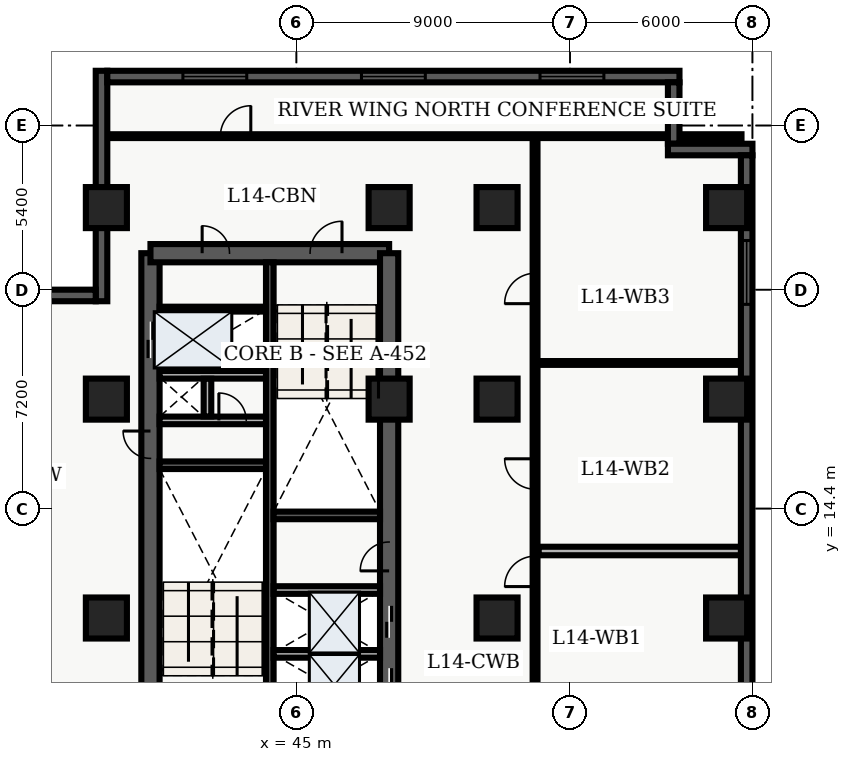
"""IFC4 building model, lengths in metres.
Left out: names, types, materials, properties, quantities, classifications, styles, units other than length and angle.
Written with IfcOpenShell. Run it as: python <this file> out.ifc"""

import sys

from ifc_helpers import new_model, entity, si_unit, converted_unit, direction, frame, origin_with_axes, origin_2d_with_axis, place, context, subcontext, project, spatial, polyline, rectangle, outline, extrude, element, fill, save


model = new_model("IFC4")
c1 = context("Model", 3, precision=1e-05, world=origin_with_axes(), true_north=direction((0.0, 1.0)))
c2 = subcontext(c1, "Body", "Model", "MODEL_VIEW")
j1 = project(units=[si_unit("LENGTHUNIT", "METRE"), converted_unit("PLANEANGLEUNIT", "DEGREE", entity("IfcPlaneAngleMeasure", 0.017), si_unit("PLANEANGLEUNIT", "RADIAN"), dimensions=[0, 0, 0, 0, 0, 0, 0])], contexts=[c1])
p1 = place(None, origin_with_axes())
s1 = spatial("IfcSite", under=j1, at=p1, CompositionType="ELEMENT")
p2 = place(p1, origin_with_axes())
s2 = spatial("IfcBuilding", under=s1, at=p2, CompositionType="ELEMENT")
p3 = place(p2, frame((0.0, 0.0, 60.0), z_axis=(0.0, 0.0, 1.0), x_axis=(1.0, 0.0, 0.0)))
s3 = spatial("IfcBuildingStorey", under=s2, at=p3, CompositionType="ELEMENT", Elevation=60.0)
p4 = place(p3, frame((40.2, 7.2, 0.0), z_axis=(0.0, 0.0, 1.0), x_axis=(0.0, 1.0, 0.0)))
e1 = element("IfcWall", 1, at=p4, inside=s3, PredefinedType="SHEAR", context=c2, shape_type="SweptSolid", body=[
    extrude(outline(polyline([(0.0, -0.3), (15.6, -0.3), (15.6, 0.3), (0.0, 0.3), (0.0, -0.3)])), origin_with_axes(), (0.0, 0.0, 1.0), 3.66),
])
p5 = place(p4, frame((12.75, 0.0, 0.0), z_axis=(0.0, 0.0, 1.0), x_axis=(1.0, 0.0, 0.0)))
e2 = element("IfcOpeningElement", 2, at=p5, cuts=e1, PredefinedType="OPENING", context=c2, shape_type="SweptSolid", body=[
    extrude(rectangle(XDim=1.2, YDim=0.62, at=origin_2d_with_axis()), origin_with_axes(), (0.0, 0.0, 1.0), 2.15),
])
p6 = place(p4, frame((9.3, 0.0, 0.0), z_axis=(0.0, 0.0, 1.0), x_axis=(1.0, 0.0, 0.0)))
e3 = element("IfcOpeningElement", 3, at=p6, cuts=e1, PredefinedType="OPENING", context=c2, shape_type="SweptSolid", body=[
    extrude(rectangle(XDim=0.9, YDim=0.62, at=origin_2d_with_axis()), origin_with_axes(), (0.0, 0.0, 1.0), 2.15),
])
p7 = place(p3, frame((40.2, 22.8, 0.0), z_axis=(0.0, 0.0, 1.0), x_axis=(1.0, 0.0, 0.0)))
e4 = element("IfcWall", 4, at=p7, inside=s3, PredefinedType="SHEAR", context=c2, shape_type="SweptSolid", body=[
    extrude(outline(polyline([(0.0, -0.3), (7.85, -0.3), (7.85, 0.3), (0.0, 0.3), (0.0, -0.3)])), origin_with_axes(), (0.0, 0.0, 1.0), 3.66),
])
p8 = place(p7, frame((5.775, 0.0, 0.0), z_axis=(0.0, 0.0, 1.0), x_axis=(1.0, 0.0, 0.0)))
e5 = element("IfcOpeningElement", 5, at=p8, cuts=e4, PredefinedType="OPENING", context=c2, shape_type="SweptSolid", body=[
    extrude(rectangle(XDim=1.05, YDim=0.62, at=origin_2d_with_axis()), origin_with_axes(), (0.0, 0.0, 1.0), 2.15),
])
p9 = place(p7, frame((2.15, 0.0, 0.0), z_axis=(0.0, 0.0, 1.0), x_axis=(1.0, 0.0, 0.0)))
e6 = element("IfcOpeningElement", 6, at=p9, cuts=e4, PredefinedType="OPENING", context=c2, shape_type="SweptSolid", body=[
    extrude(rectangle(XDim=0.9, YDim=0.62, at=origin_2d_with_axis()), origin_with_axes(), (0.0, 0.0, 1.0), 2.15),
])
p10 = place(p3, frame((48.05, 7.2, 0.0), z_axis=(0.0, 0.0, 1.0), x_axis=(0.0, 1.0, 0.0)))
e7 = element("IfcWall", 7, at=p10, inside=s3, PredefinedType="SHEAR", context=c2, shape_type="SweptSolid", body=[
    extrude(outline(polyline([(0.0, -0.3), (15.6, -0.3), (15.6, 0.3), (0.0, 0.3), (0.0, -0.3)])), origin_with_axes(), (0.0, 0.0, 1.0), 3.66),
])
p11 = place(p10, frame((1.425, 0.0, 0.0), z_axis=(0.0, 0.0, 1.0), x_axis=(1.0, 0.0, 0.0)))
e8 = element("IfcOpeningElement", 8, at=p11, cuts=e7, PredefinedType="OPENING", context=c2, shape_type="SweptSolid", body=[
    extrude(rectangle(XDim=1.05, YDim=0.62, at=origin_2d_with_axis()), origin_with_axes(), (0.0, 0.0, 1.0), 2.15),
])
p12 = place(p10, frame((3.475, 0.0, 0.0), z_axis=(0.0, 0.0, 1.0), x_axis=(1.0, 0.0, 0.0)))
e9 = element("IfcOpeningElement", 9, at=p12, cuts=e7, PredefinedType="OPENING", context=c2, shape_type="SweptSolid", body=[
    extrude(rectangle(XDim=1.05, YDim=0.62, at=origin_2d_with_axis()), origin_with_axes(), (0.0, 0.0, 1.0), 2.15),
])
p13 = place(p10, frame((5.625, 0.0, 0.0), z_axis=(0.0, 0.0, 1.0), x_axis=(1.0, 0.0, 0.0)))
e10 = element("IfcOpeningElement", 10, at=p13, cuts=e7, PredefinedType="OPENING", context=c2, shape_type="SweptSolid", body=[
    extrude(rectangle(XDim=0.95, YDim=0.62, at=origin_2d_with_axis()), origin_with_axes(), (0.0, 0.0, 1.0), 2.15),
])
p14 = place(p3, frame((44.125, 7.5, 0.0), z_axis=(0.0, 0.0, 1.0), x_axis=(0.0, 1.0, 0.0)))
e11 = element("IfcWall", 11, at=p14, inside=s3, PredefinedType="SHEAR", context=c2, shape_type="SweptSolid", body=[
    extrude(outline(polyline([(0.0, -0.125), (15.0, -0.125), (15.0, 0.125), (0.0, 0.125), (0.0, -0.125)])), origin_with_axes(), (0.0, 0.0, 1.0), 3.66),
])
for number, where, z_axis, x_axis in (
    (12, (40.5, 15.825, 0.0), (0.0, 0.0, 1.0), (1.0, 0.0, 0.0)),
    (13, (44.25, 14.175, 0.0), (0.0, 0.0, 1.0), (1.0, 0.0, 0.0)),
):
    element("IfcWall", number, at=place(p3, frame(where, z_axis=z_axis, x_axis=x_axis)), inside=s3, PredefinedType="SHEAR", context=c2, shape_type="SweptSolid", body=[
        extrude(outline(polyline([(0.0, -0.125), (3.5, -0.125), (3.5, 0.125), (0.0, 0.125), (0.0, -0.125)])), origin_with_axes(), (0.0, 0.0, 1.0), 3.66),
    ])
p15 = place(p3, frame((40.5, 17.3, 0.0), z_axis=(0.0, 0.0, 1.0), x_axis=(1.0, 0.0, 0.0)))
e14 = element("IfcWall", 14, at=p15, inside=s3, PredefinedType="SOLIDWALL", context=c2, shape_type="SweptSolid", body=[
    extrude(outline(polyline([(0.0, -0.125), (3.5, -0.125), (3.5, 0.125), (0.0, 0.125), (0.0, -0.125)])), origin_with_axes(), (0.0, 0.0, 1.0), 2.7),
])
p16 = place(p15, frame((2.4, 0.0, 0.0), z_axis=(0.0, 0.0, 1.0), x_axis=(1.0, 0.0, 0.0)))
e15 = element("IfcOpeningElement", 15, at=p16, cuts=e14, PredefinedType="OPENING", context=c2, shape_type="SweptSolid", body=[
    extrude(rectangle(XDim=0.9, YDim=0.27, at=origin_2d_with_axis()), origin_with_axes(), (0.0, 0.0, 1.0), 2.15),
])
p17 = place(p3, frame((40.5, 18.8, 0.0), z_axis=(0.0, 0.0, 1.0), x_axis=(1.0, 0.0, 0.0)))
e16 = element("IfcWall", 16, at=p17, inside=s3, PredefinedType="SOLIDWALL", context=c2, shape_type="SweptSolid", body=[
    extrude(outline(polyline([(0.0, -0.125), (3.5, -0.125), (3.5, 0.125), (0.0, 0.125), (0.0, -0.125)])), origin_with_axes(), (0.0, 0.0, 1.0), 2.7),
])
p18 = place(p3, frame((42.075, 17.43, 0.0), z_axis=(0.0, 0.0, 1.0), x_axis=(0.0, 1.0, 0.0)))
e17 = element("IfcWall", 17, at=p18, inside=s3, PredefinedType="SOLIDWALL", context=c2, shape_type="SweptSolid", body=[
    extrude(outline(polyline([(0.0, -0.125), (1.24, -0.125), (1.24, 0.125), (0.0, 0.125), (0.0, -0.125)])), origin_with_axes(), (0.0, 0.0, 1.0), 2.7),
])
for number, where, z_axis, x_axis in (
    (18, (38.75, 10.8, 0.0), (0.0, 0.0, 1.0), (1.0, 0.0, 0.0)),
    (19, (38.75, 18.0, 0.0), (0.0, 0.0, 1.0), (1.0, 0.0, 0.0)),
    (20, (38.75, 24.3, 0.0), (0.0, 0.0, 1.0), (1.0, 0.0, 0.0)),
    (21, (48.05, 18.0, 0.0), (0.0, 0.0, 1.0), (1.0, 0.0, 0.0)),
    (22, (48.05, 24.3, 0.0), (0.0, 0.0, 1.0), (1.0, 0.0, 0.0)),
    (23, (51.6, 10.8, 0.0), (0.0, 0.0, 1.0), (1.0, 0.0, 0.0)),
    (24, (51.6, 18.0, 0.0), (0.0, 0.0, 1.0), (1.0, 0.0, 0.0)),
    (25, (51.6, 24.3, 0.0), (0.0, 0.0, 1.0), (1.0, 0.0, 0.0)),
    (26, (59.15, 10.8, 0.0), (0.0, 0.0, 1.0), (1.0, 0.0, 0.0)),
    (27, (59.15, 18.0, 0.0), (0.0, 0.0, 1.0), (1.0, 0.0, 0.0)),
    (28, (59.15, 24.3, 0.0), (0.0, 0.0, 1.0), (1.0, 0.0, 0.0)),
):
    element("IfcColumn", number, at=place(p3, frame(where, z_axis=z_axis, x_axis=x_axis)), inside=s3, PredefinedType="COLUMN", context=c2, shape_type="SweptSolid", body=[
        extrude(rectangle(XDim=1.35, YDim=1.35, at=origin_2d_with_axis()), origin_with_axes(), (0.0, 0.0, 1.0), 3.9),
    ])
p19 = place(p3, frame((40.5, 20.96, 0.0), z_axis=(0.0, 0.0, 1.0), x_axis=(1.0, 0.0, 0.0)))
e29 = element("IfcWall", 29, at=p19, inside=s3, PredefinedType="PARTITIONING", context=c2, shape_type="SweptSolid", body=[
    extrude(outline(polyline([(0.0, -0.08), (3.5, -0.08), (3.5, 0.08), (0.0, 0.08), (0.0, -0.08)])), origin_with_axes(), (0.0, 0.0, 1.0), 2.7),
])
for number, where, z_axis, x_axis in (
    (30, (44.25, 9.62, 0.0), (0.0, 0.0, 1.0), (1.0, 0.0, 0.0)),
    (31, (44.25, 11.72, 0.0), (0.0, 0.0, 1.0), (1.0, 0.0, 0.0)),
):
    element("IfcWall", number, at=place(p3, frame(where, z_axis=z_axis, x_axis=x_axis)), inside=s3, PredefinedType="SOLIDWALL", context=c2, shape_type="SweptSolid", body=[
        extrude(outline(polyline([(0.0, -0.125), (3.5, -0.125), (3.5, 0.125), (0.0, 0.125), (0.0, -0.125)])), origin_with_axes(), (0.0, 0.0, 1.0), 2.7),
    ])
p20 = place(p3, frame((52.85, 7.85, 0.0), z_axis=(0.0, 0.0, 1.0), x_axis=(0.0, 1.0, 0.0)))
e32 = element("IfcWall", 32, at=p20, inside=s3, PredefinedType="PARTITIONING", context=c2, shape_type="SweptSolid", body=[
    extrude(outline(polyline([(0.0, -0.08), (18.8, -0.08), (18.8, 0.08), (0.0, 0.08), (0.0, -0.08)])), origin_with_axes(), (0.0, 0.0, 1.0), 2.7),
])
p21 = place(p20, frame((4.484, 0.0, 0.0), z_axis=(0.0, 0.0, 1.0), x_axis=(1.0, 0.0, 0.0)))
e33 = element("IfcOpeningElement", 33, at=p21, cuts=e32, PredefinedType="OPENING", context=c2, shape_type="SweptSolid", body=[
    extrude(rectangle(XDim=1.0, YDim=0.18, at=origin_2d_with_axis()), origin_with_axes(), (0.0, 0.0, 1.0), 2.15),
])
p22 = place(p20, frame((7.687, 0.0, 0.0), z_axis=(0.0, 0.0, 1.0), x_axis=(1.0, 0.0, 0.0)))
e34 = element("IfcOpeningElement", 34, at=p22, cuts=e32, PredefinedType="OPENING", context=c2, shape_type="SweptSolid", body=[
    extrude(rectangle(XDim=1.0, YDim=0.18, at=origin_2d_with_axis()), origin_with_axes(), (0.0, 0.0, 1.0), 2.15),
])
p23 = place(p20, frame((13.79, 0.0, 0.0), z_axis=(0.0, 0.0, 1.0), x_axis=(1.0, 0.0, 0.0)))
e35 = element("IfcOpeningElement", 35, at=p23, cuts=e32, PredefinedType="OPENING", context=c2, shape_type="SweptSolid", body=[
    extrude(rectangle(XDim=1.0, YDim=0.18, at=origin_2d_with_axis()), origin_with_axes(), (0.0, 0.0, 1.0), 2.15),
])
p24 = place(p3, frame((38.76, 26.65, 0.0), z_axis=(0.0, 0.0, 1.0), x_axis=(1.0, 0.0, 0.0)))
e36 = element("IfcWall", 36, at=p24, inside=s3, PredefinedType="PARTITIONING", context=c2, shape_type="SweptSolid", body=[
    extrude(outline(polyline([(0.0, -0.062), (20.88, -0.062), (20.88, 0.062), (0.0, 0.062), (0.0, -0.062)])), origin_with_axes(), (0.0, 0.0, 1.0), 2.7),
])
p25 = place(p24, frame((4.24, 0.0, 0.0), z_axis=(0.0, 0.0, 1.0), x_axis=(1.0, 0.0, 0.0)))
e37 = element("IfcOpeningElement", 37, at=p25, cuts=e36, PredefinedType="OPENING", context=c2, shape_type="SweptSolid", body=[
    extrude(rectangle(XDim=1.0, YDim=0.145, at=origin_2d_with_axis()), origin_with_axes(), (0.0, 0.0, 1.0), 2.15),
])
p26 = place(p3, frame((52.97, 13.004, 0.0), z_axis=(0.0, 0.0, 1.0), x_axis=(1.0, 0.0, 0.0)))
e38 = element("IfcWall", 38, at=p26, inside=s3, PredefinedType="PARTITIONING", context=c2, shape_type="SweptSolid", body=[
    extrude(outline(polyline([(0.0, -0.14), (6.655, -0.14), (6.655, 0.14), (0.0, 0.14), (0.0, -0.14)])), origin_with_axes(), (0.0, 0.0, 1.0), 2.7),
])
p27 = place(p3, frame((52.97, 19.189, 0.0), z_axis=(0.0, 0.0, 1.0), x_axis=(1.0, 0.0, 0.0)))
e39 = element("IfcWall", 39, at=p27, inside=s3, PredefinedType="PARTITIONING", context=c2, shape_type="SweptSolid", body=[
    extrude(outline(polyline([(0.0, -0.062), (6.655, -0.062), (6.655, 0.062), (0.0, 0.062), (0.0, -0.062)])), origin_with_axes(), (0.0, 0.0, 1.0), 2.7),
])
p28 = place(p3, frame((38.59, 21.22, 0.0), z_axis=(0.0, 0.0, 1.0), x_axis=(0.0, 1.0, 0.0)))
e40 = element("IfcWall", 40, at=p28, inside=s3, PredefinedType="SOLIDWALL", context=c2, shape_type="SweptSolid", body=[
    extrude(outline(polyline([(0.0, -0.19), (7.58, -0.19), (7.58, 0.19), (0.0, 0.19), (0.0, -0.19)])), origin_with_axes(), (0.0, 0.0, 1.0), 3.66),
])
p29 = place(p3, frame((38.78, 28.61, 0.0), z_axis=(0.0, 0.0, 1.0), x_axis=(1.0, 0.0, 0.0)))
e41 = element("IfcWall", 41, at=p29, inside=s3, PredefinedType="SOLIDWALL", context=c2, shape_type="SweptSolid", body=[
    extrude(outline(polyline([(0.0, -0.19), (18.82, -0.19), (18.82, 0.19), (0.0, 0.19), (0.0, -0.19)])), origin_with_axes(), (0.0, 0.0, 1.0), 3.66),
])
p30 = place(p29, frame((3.537, 0.0, 0.45), z_axis=(0.0, 0.0, 1.0), x_axis=(1.0, 0.0, 0.0)))
e42 = element("IfcOpeningElement", 42, at=p30, cuts=e41, PredefinedType="OPENING", context=c2, shape_type="SweptSolid", body=[
    extrude(rectangle(XDim=2.1, YDim=0.4, at=origin_2d_with_axis()), origin_with_axes(), (0.0, 0.0, 1.0), 2.2),
])
p31 = place(p29, frame((9.41, 0.0, 0.45), z_axis=(0.0, 0.0, 1.0), x_axis=(1.0, 0.0, 0.0)))
e43 = element("IfcOpeningElement", 43, at=p31, cuts=e41, PredefinedType="OPENING", context=c2, shape_type="SweptSolid", body=[
    extrude(rectangle(XDim=2.1, YDim=0.4, at=origin_2d_with_axis()), origin_with_axes(), (0.0, 0.0, 1.0), 2.2),
])
p32 = place(p29, frame((15.283, 0.0, 0.45), z_axis=(0.0, 0.0, 1.0), x_axis=(1.0, 0.0, 0.0)))
e44 = element("IfcOpeningElement", 44, at=p32, cuts=e41, PredefinedType="OPENING", context=c2, shape_type="SweptSolid", body=[
    extrude(rectangle(XDim=2.1, YDim=0.4, at=origin_2d_with_axis()), origin_with_axes(), (0.0, 0.0, 1.0), 2.2),
])
p33 = place(p3, frame((57.41, 28.42, 0.0), z_axis=(0.0, 0.0, 1.0), x_axis=(0.0, -1.0, 0.0)))
e45 = element("IfcWall", 45, at=p33, inside=s3, PredefinedType="SOLIDWALL", context=c2, shape_type="SweptSolid", body=[
    extrude(outline(polyline([(0.0, -0.19), (2.02, -0.19), (2.02, 0.19), (0.0, 0.19), (0.0, -0.19)])), origin_with_axes(), (0.0, 0.0, 1.0), 3.66),
])
p34 = place(p3, frame((57.22, 26.21, 0.0), z_axis=(0.0, 0.0, 1.0), x_axis=(1.0, 0.0, 0.0)))
e46 = element("IfcWall", 46, at=p34, inside=s3, PredefinedType="SOLIDWALL", context=c2, shape_type="SweptSolid", body=[
    extrude(outline(polyline([(0.0, -0.19), (2.78, -0.19), (2.78, 0.19), (0.0, 0.19), (0.0, -0.19)])), origin_with_axes(), (0.0, 0.0, 1.0), 3.66),
])
p35 = place(p3, frame((59.81, 26.02, 0.0), z_axis=(0.0, 0.0, 1.0), x_axis=(0.0, -1.0, 0.0)))
e47 = element("IfcWall", 47, at=p35, inside=s3, PredefinedType="SOLIDWALL", context=c2, shape_type="SweptSolid", body=[
    extrude(outline(polyline([(0.0, -0.19), (23.62, -0.19), (23.62, 0.19), (0.0, 0.19), (0.0, -0.19)])), origin_with_axes(), (0.0, 0.0, 1.0), 3.66),
])
p36 = place(p35, frame((3.853, 0.0, 0.45), z_axis=(0.0, 0.0, 1.0), x_axis=(1.0, 0.0, 0.0)))
e48 = element("IfcOpeningElement", 48, at=p36, cuts=e47, PredefinedType="OPENING", context=c2, shape_type="SweptSolid", body=[
    extrude(rectangle(XDim=2.1, YDim=0.4, at=origin_2d_with_axis()), origin_with_axes(), (0.0, 0.0, 1.0), 2.2),
])
p37 = place(p35, frame((20.218, 0.0, 0.45), z_axis=(0.0, 0.0, 1.0), x_axis=(1.0, 0.0, 0.0)))
e49 = element("IfcOpeningElement", 49, at=p37, cuts=e47, PredefinedType="OPENING", context=c2, shape_type="SweptSolid", body=[
    extrude(rectangle(XDim=2.1, YDim=0.4, at=origin_2d_with_axis()), origin_with_axes(), (0.0, 0.0, 1.0), 2.2),
])
p38 = place(p3, frame((21.22, 21.41, 0.0), z_axis=(0.0, 0.0, 1.0), x_axis=(1.0, 0.0, 0.0)))
e50 = element("IfcWall", 50, at=p38, inside=s3, PredefinedType="SOLIDWALL", context=c2, shape_type="SweptSolid", body=[
    extrude(outline(polyline([(0.0, -0.19), (17.18, -0.19), (17.18, 0.19), (0.0, 0.19), (0.0, -0.19)])), origin_with_axes(), (0.0, 0.0, 1.0), 3.66),
])
p39 = place(p38, frame((3.263, 0.0, 0.45), z_axis=(0.0, 0.0, 1.0), x_axis=(1.0, 0.0, 0.0)))
e51 = element("IfcOpeningElement", 51, at=p39, cuts=e50, PredefinedType="OPENING", context=c2, shape_type="SweptSolid", body=[
    extrude(rectangle(XDim=2.1, YDim=0.4, at=origin_2d_with_axis()), origin_with_axes(), (0.0, 0.0, 1.0), 2.2),
])
p40 = place(p38, frame((8.59, 0.0, 0.45), z_axis=(0.0, 0.0, 1.0), x_axis=(1.0, 0.0, 0.0)))
e52 = element("IfcOpeningElement", 52, at=p40, cuts=e50, PredefinedType="OPENING", context=c2, shape_type="SweptSolid", body=[
    extrude(rectangle(XDim=2.1, YDim=0.4, at=origin_2d_with_axis()), origin_with_axes(), (0.0, 0.0, 1.0), 2.2),
])
p41 = place(p38, frame((13.467, 0.0, 0.45), z_axis=(0.0, 0.0, 1.0), x_axis=(1.0, 0.0, 0.0)))
e53 = element("IfcOpeningElement", 53, at=p41, cuts=e50, PredefinedType="OPENING", context=c2, shape_type="SweptSolid", body=[
    extrude(rectangle(XDim=2.1, YDim=0.4, at=origin_2d_with_axis()), origin_with_axes(), (0.0, 0.0, 1.0), 2.2),
])
p42 = place(p10, frame((1.425, 0.0, 0.0), z_axis=(0.0, 0.0, 1.0), x_axis=(1.0, 0.0, 0.0)))
e54 = element("IfcDoor", 54, at=p42, inside=s3, OperationType="SLIDING_TO_LEFT", PredefinedType="DOOR", context=c2, shape_type="SweptSolid", body=[
    extrude(rectangle(XDim=1.05, YDim=0.09, at=origin_2d_with_axis()), origin_with_axes(), (0.0, 0.0, 1.0), 2.15),
])
fill(e8, e54)
p43 = place(p10, frame((3.475, 0.0, 0.0), z_axis=(0.0, 0.0, 1.0), x_axis=(1.0, 0.0, 0.0)))
e55 = element("IfcDoor", 55, at=p43, inside=s3, OperationType="SLIDING_TO_RIGHT", PredefinedType="DOOR", context=c2, shape_type="SweptSolid", body=[
    extrude(rectangle(XDim=1.05, YDim=0.09, at=origin_2d_with_axis()), origin_with_axes(), (0.0, 0.0, 1.0), 2.15),
])
fill(e9, e55)
p44 = place(p4, frame((12.75, 0.0, 0.0), z_axis=(0.0, 0.0, 1.0), x_axis=(1.0, 0.0, 0.0)))
e56 = element("IfcDoor", 56, at=p44, inside=s3, OperationType="DOUBLE_DOOR_SLIDING", PredefinedType="DOOR", context=c2, shape_type="SweptSolid", body=[
    extrude(rectangle(XDim=1.2, YDim=0.09, at=origin_2d_with_axis()), origin_with_axes(), (0.0, 0.0, 1.0), 2.15),
])
fill(e2, e56)
p45 = place(p4, frame((9.3, 0.0, 0.0), z_axis=(0.0, 0.0, 1.0), x_axis=(1.0, 0.0, 0.0)))
e57 = element("IfcDoor", 57, at=p45, inside=s3, OperationType="SINGLE_SWING_RIGHT", PredefinedType="DOOR", context=c2, shape_type="SweptSolid", body=[
    extrude(rectangle(XDim=0.9, YDim=0.09, at=origin_2d_with_axis()), origin_with_axes(), (0.0, 0.0, 1.0), 2.15),
])
fill(e3, e57)
p46 = place(p15, frame((2.4, 0.0, 0.0), z_axis=(0.0, 0.0, 1.0), x_axis=(1.0, 0.0, 0.0)))
e58 = element("IfcDoor", 58, at=p46, inside=s3, OperationType="SINGLE_SWING_LEFT", PredefinedType="DOOR", context=c2, shape_type="SweptSolid", body=[
    extrude(rectangle(XDim=0.9, YDim=0.09, at=origin_2d_with_axis()), origin_with_axes(), (0.0, 0.0, 1.0), 2.15),
])
fill(e15, e58)
p47 = place(p7, frame((5.775, 0.0, 0.0), z_axis=(0.0, 0.0, 1.0), x_axis=(1.0, 0.0, 0.0)))
e59 = element("IfcDoor", 59, at=p47, inside=s3, OperationType="SINGLE_SWING_RIGHT", PredefinedType="DOOR", context=c2, shape_type="SweptSolid", body=[
    extrude(rectangle(XDim=1.05, YDim=0.09, at=origin_2d_with_axis()), origin_with_axes(), (0.0, 0.0, 1.0), 2.15),
])
fill(e5, e59)
p48 = place(p7, frame((2.15, 0.0, 0.0), z_axis=(0.0, 0.0, 1.0), x_axis=(1.0, 0.0, 0.0)))
e60 = element("IfcDoor", 60, at=p48, inside=s3, OperationType="SINGLE_SWING_LEFT", PredefinedType="DOOR", context=c2, shape_type="SweptSolid", body=[
    extrude(rectangle(XDim=0.9, YDim=0.09, at=origin_2d_with_axis()), origin_with_axes(), (0.0, 0.0, 1.0), 2.15),
])
fill(e6, e60)
p49 = place(p10, frame((5.625, 0.0, 0.0), z_axis=(0.0, 0.0, 1.0), x_axis=(1.0, 0.0, 0.0)))
e61 = element("IfcDoor", 61, at=p49, inside=s3, OperationType="SINGLE_SWING_LEFT", PredefinedType="DOOR", context=c2, shape_type="SweptSolid", body=[
    extrude(rectangle(XDim=0.95, YDim=0.09, at=origin_2d_with_axis()), origin_with_axes(), (0.0, 0.0, 1.0), 2.15),
])
fill(e10, e61)
p50 = place(p24, frame((4.24, 0.0, 0.0), z_axis=(0.0, 0.0, 1.0), x_axis=(1.0, 0.0, 0.0)))
e62 = element("IfcDoor", 62, at=p50, inside=s3, OperationType="SINGLE_SWING_RIGHT", PredefinedType="DOOR", context=c2, shape_type="SweptSolid", body=[
    extrude(rectangle(XDim=1.0, YDim=0.075, at=origin_2d_with_axis()), origin_with_axes(), (0.0, 0.0, 1.0), 2.15),
])
fill(e37, e62)
p51 = place(p20, frame((4.484, 0.0, 0.0), z_axis=(0.0, 0.0, 1.0), x_axis=(1.0, 0.0, 0.0)))
e63 = element("IfcDoor", 63, at=p51, inside=s3, OperationType="SINGLE_SWING_LEFT", PredefinedType="DOOR", context=c2, shape_type="SweptSolid", body=[
    extrude(rectangle(XDim=1.0, YDim=0.09, at=origin_2d_with_axis()), origin_with_axes(), (0.0, 0.0, 1.0), 2.15),
])
fill(e33, e63)
p52 = place(p20, frame((7.687, 0.0, 0.0), z_axis=(0.0, 0.0, 1.0), x_axis=(1.0, 0.0, 0.0)))
e64 = element("IfcDoor", 64, at=p52, inside=s3, OperationType="SINGLE_SWING_RIGHT", PredefinedType="DOOR", context=c2, shape_type="SweptSolid", body=[
    extrude(rectangle(XDim=1.0, YDim=0.09, at=origin_2d_with_axis()), origin_with_axes(), (0.0, 0.0, 1.0), 2.15),
])
fill(e34, e64)
p53 = place(p20, frame((13.79, 0.0, 0.0), z_axis=(0.0, 0.0, 1.0), x_axis=(1.0, 0.0, 0.0)))
e65 = element("IfcDoor", 65, at=p53, inside=s3, OperationType="SINGLE_SWING_LEFT", PredefinedType="DOOR", context=c2, shape_type="SweptSolid", body=[
    extrude(rectangle(XDim=1.0, YDim=0.09, at=origin_2d_with_axis()), origin_with_axes(), (0.0, 0.0, 1.0), 2.15),
])
fill(e35, e65)
p54 = place(p29, frame((3.537, 0.0, 0.45), z_axis=(0.0, 0.0, 1.0), x_axis=(1.0, 0.0, 0.0)))
e66 = element("IfcWindow", 66, at=p54, inside=s3, PredefinedType="WINDOW", context=c2, shape_type="SweptSolid", body=[
    extrude(rectangle(XDim=2.1, YDim=0.09, at=origin_2d_with_axis()), origin_with_axes(), (0.0, 0.0, 1.0), 2.2),
])
fill(e42, e66)
p55 = place(p29, frame((9.41, 0.0, 0.45), z_axis=(0.0, 0.0, 1.0), x_axis=(1.0, 0.0, 0.0)))
e67 = element("IfcWindow", 67, at=p55, inside=s3, PredefinedType="WINDOW", context=c2, shape_type="SweptSolid", body=[
    extrude(rectangle(XDim=2.1, YDim=0.09, at=origin_2d_with_axis()), origin_with_axes(), (0.0, 0.0, 1.0), 2.2),
])
fill(e43, e67)
p56 = place(p29, frame((15.283, 0.0, 0.45), z_axis=(0.0, 0.0, 1.0), x_axis=(1.0, 0.0, 0.0)))
e68 = element("IfcWindow", 68, at=p56, inside=s3, PredefinedType="WINDOW", context=c2, shape_type="SweptSolid", body=[
    extrude(rectangle(XDim=2.1, YDim=0.09, at=origin_2d_with_axis()), origin_with_axes(), (0.0, 0.0, 1.0), 2.2),
])
fill(e44, e68)
p57 = place(p35, frame((3.853, 0.0, 0.45), z_axis=(0.0, 0.0, 1.0), x_axis=(1.0, 0.0, 0.0)))
e69 = element("IfcWindow", 69, at=p57, inside=s3, PredefinedType="WINDOW", context=c2, shape_type="SweptSolid", body=[
    extrude(rectangle(XDim=2.1, YDim=0.09, at=origin_2d_with_axis()), origin_with_axes(), (0.0, 0.0, 1.0), 2.2),
])
fill(e48, e69)
save(model, sys.argv[1])
